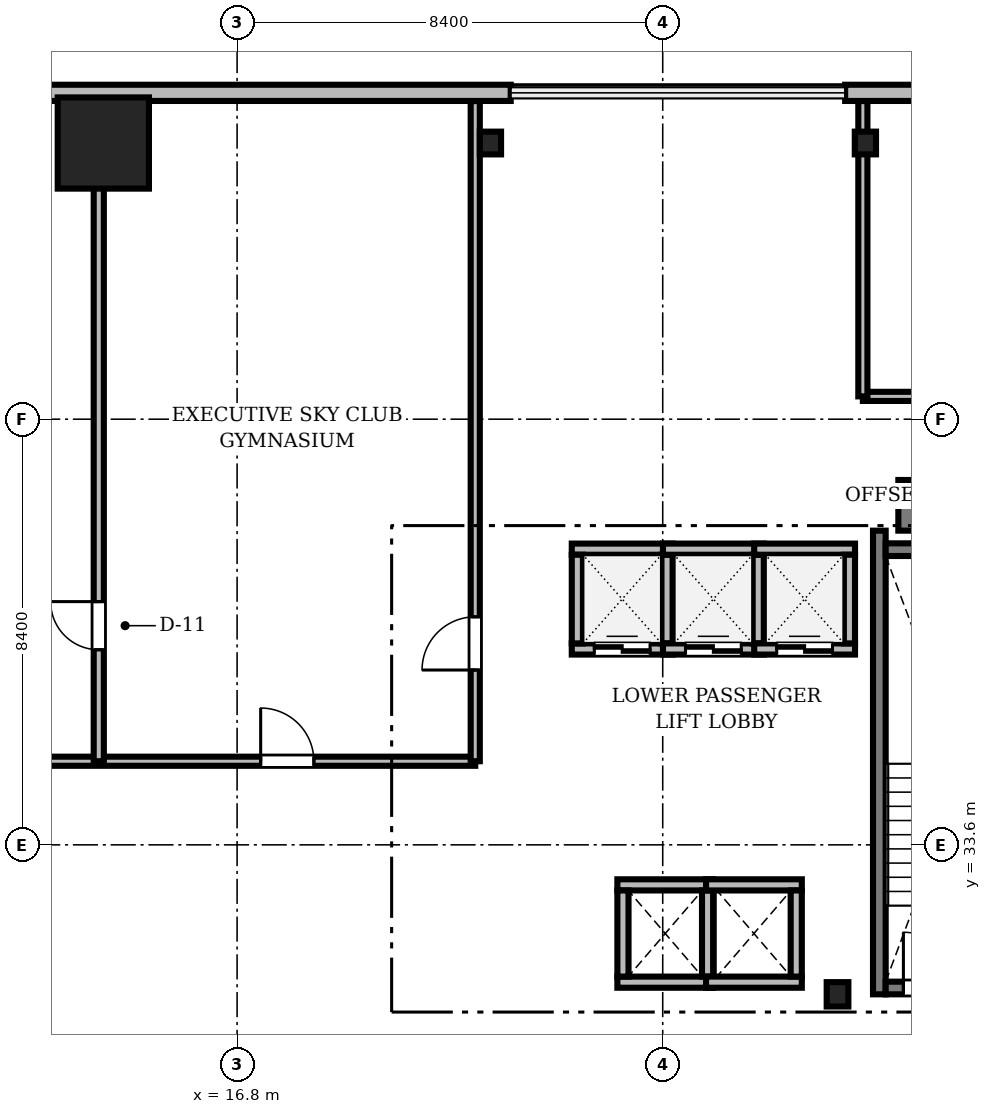
"""IFC4 building model, lengths in metres.
Left out: names, types, materials, properties, quantities, classifications, styles, units other than length and angle.
Written with IfcOpenShell. Run it as: python <this file> out.ifc"""

import sys

from ifc_helpers import new_model, si_unit, direction, frame, frame_2d, origin, origin_2d, place, context, subcontext, project, spatial, rectangle, i_section, extrude, source, transform, mapped, element, fill, save


model = new_model("IFC4")
c1 = context("Model", 3, precision=1e-05, world=origin(), true_north=direction((0.0, 1.0)))
c2 = subcontext(c1, "Body", "Model", "MODEL_VIEW")
j1 = project(units=[si_unit("LENGTHUNIT", "METRE"), si_unit("PLANEANGLEUNIT", "RADIAN")], contexts=[c1])
p1 = place(None, origin())
s1 = spatial("IfcSite", under=j1, at=p1, CompositionType="ELEMENT")
p2 = place(p1, origin())
s2 = spatial("IfcBuilding", under=s1, at=p2, CompositionType="ELEMENT")
p3 = place(p2, frame((0.0, 0.0, 78.7)))
s3 = spatial("IfcBuildingStorey", under=s2, at=p3, CompositionType="ELEMENT", Elevation=78.7)
m1 = source(origin(), c2, "Body", "SweptSolid", [
    extrude(rectangle(XDim=17.52, YDim=1.0, at=frame_2d((8.76, 0.0))), origin(), (0.0, 0.0, 1.0), 3.41),
])
p4 = place(p3, frame((29.85, 40.3, 0.0), z_axis=(0.0, 0.0, 1.0), x_axis=(1.0, 0.0, 0.0)))
e1 = element("IfcWall", 1, at=p4, inside=s3, PredefinedType="SHEAR", context=c2, shape_type="MappedRepresentation", body=[
    mapped(m1, transform((0.0, 0.0, 0.0), scale=1.0)),
])
m2 = source(origin(), c2, "Body", "SweptSolid", [
    extrude(i_section(OverallWidth=0.428, OverallDepth=0.481, WebThickness=0.04, FlangeThickness=0.063, FilletRadius=0.015, at=origin_2d()), origin(), (0.0, 0.0, 1.0), 3.41),
])
p5 = place(p3, frame((28.65, 30.65, 0.0), z_axis=(0.0, 0.0, 1.0), x_axis=(1.0, 0.0, 0.0)))
e2 = element("IfcColumn", 2, at=p5, inside=s3, PredefinedType="COLUMN", context=c2, shape_type="MappedRepresentation", body=[
    mapped(m2, transform((0.0, 0.0, 0.0), scale=1.0)),
])
m3 = source(origin(), c2, "Body", "SweptSolid", [
    extrude(rectangle(XDim=1.8, YDim=1.8, at=origin_2d()), origin(), (0.0, 0.0, 1.0), 3.41),
])
p6 = place(p3, frame((14.16, 47.45, 0.0), z_axis=(0.0, 0.0, 1.0), x_axis=(1.0, 0.0, 0.0)))
e3 = element("IfcColumn", 3, at=p6, inside=s3, PredefinedType="COLUMN", context=c2, shape_type="MappedRepresentation", body=[
    mapped(m3, transform((0.0, 0.0, 0.0), scale=1.0)),
])
m4 = source(origin(), c2, "Body", "SweptSolid", [
    extrude(i_section(OverallWidth=0.419, OverallDepth=0.449, WebThickness=0.031, FlangeThickness=0.048, FilletRadius=0.015, at=origin_2d()), origin(), (0.0, 0.0, 1.0), 3.41),
])
for number, where, z_axis, x_axis in (
    (4, (29.2, 47.45, 0.0), (0.0, 0.0, 1.0), (1.0, 0.0, 0.0)),
    (5, (21.8, 47.45, 0.0), (0.0, 0.0, 1.0), (1.0, 0.0, 0.0)),
):
    element("IfcColumn", number, at=place(p3, frame(where, z_axis=z_axis, x_axis=x_axis)), inside=s3, PredefinedType="COLUMN", context=c2, shape_type="MappedRepresentation", body=[
        mapped(m4, transform((0.0, 0.0, 0.0), scale=1.0)),
    ])
m5 = source(origin(), c2, "Body", "SweptSolid", [
    extrude(rectangle(XDim=15.6, YDim=0.32, at=frame_2d((7.8, 0.0))), origin(), (0.0, 0.0, 1.0), 3.41),
])
p7 = place(p3, frame((44.4, 48.44, 0.0), z_axis=(0.0, 0.0, 1.0), x_axis=(-1.0, 0.0, 0.0)))
e6 = element("IfcWall", 6, at=p7, inside=s3, PredefinedType="SOLIDWALL", context=c2, shape_type="MappedRepresentation", body=[
    mapped(m5, transform((0.0, 0.0, 0.0), scale=1.0)),
])
m6 = source(origin(), c2, "Body", "SweptSolid", [
    extrude(rectangle(XDim=1.4, YDim=2.3, at=frame_2d((0.7, 1.15))), frame((0.0, 0.17, 0.0), z_axis=(0.0, -1.0, 0.0), x_axis=(1.0, 0.0, 0.0)), (0.0, 0.0, 1.0), 0.34),
])
p8 = place(p7, frame((9.61, 0.0, 0.0)))
e7 = element("IfcOpeningElement", 7, at=p8, cuts=e6, PredefinedType="OPENING", context=c2, shape_type="MappedRepresentation", body=[
    mapped(m6, transform((0.0, 0.0, 0.0), scale=1.0)),
])
m7 = source(origin(), c2, "Body", "SweptSolid", [
    extrude(rectangle(XDim=2.8, YDim=2.4, at=frame_2d((1.4, 1.2))), frame((0.0, 0.17, 0.0), z_axis=(0.0, -1.0, 0.0), x_axis=(1.0, 0.0, 0.0)), (0.0, 0.0, 1.0), 0.34),
])
p9 = place(p7, frame((2.705, 0.0, 0.72)))
e8 = element("IfcOpeningElement", 8, at=p9, cuts=e6, PredefinedType="OPENING", context=c2, shape_type="MappedRepresentation", body=[
    mapped(m7, transform((0.0, 0.0, 0.0), scale=1.0)),
])
p10 = place(p3, frame((22.2, 48.44, 0.0), z_axis=(0.0, 0.0, 1.0), x_axis=(-1.0, 0.0, 0.0)))
e9 = element("IfcWall", 9, at=p10, inside=s3, PredefinedType="SOLIDWALL", context=c2, shape_type="MappedRepresentation", body=[
    mapped(m5, transform((0.0, 0.0, 0.0), scale=1.0)),
])
p11 = place(p10, frame((10.095, 0.0, 0.72)))
e10 = element("IfcOpeningElement", 10, at=p11, cuts=e9, PredefinedType="OPENING", context=c2, shape_type="MappedRepresentation", body=[
    mapped(m7, transform((0.0, 0.0, 0.0), scale=1.0)),
])
m8 = source(origin(), c2, "Body", "SweptSolid", [
    extrude(rectangle(XDim=9.15, YDim=0.25, at=frame_2d((4.575, 0.0))), origin(), (0.0, 0.0, 1.0), 3.45),
])
p12 = place(p3, frame((29.475, 30.65, 0.0), z_axis=(0.0, 0.0, 1.0), x_axis=(0.0, 1.0, 0.0)))
e11 = element("IfcWall", 11, at=p12, inside=s3, PredefinedType="SOLIDWALL", context=c2, shape_type="MappedRepresentation", body=[
    mapped(m8, transform((0.0, 0.0, 0.0), scale=1.0)),
])
m9 = source(origin(), c2, "Body", "SweptSolid", [
    extrude(rectangle(XDim=3.15, YDim=0.25, at=frame_2d((1.575, 0.0))), origin(), (0.0, 0.0, 1.0), 3.45),
])
p13 = place(p3, frame((29.6, 39.425, 0.0), z_axis=(0.0, 0.0, 1.0), x_axis=(1.0, 0.0, 0.0)))
e12 = element("IfcWall", 12, at=p13, inside=s3, PredefinedType="SOLIDWALL", context=c2, shape_type="MappedRepresentation", body=[
    mapped(m9, transform((0.0, 0.0, 0.0), scale=1.0)),
])
p14 = place(p3, frame((29.6, 30.775, 0.0), z_axis=(0.0, 0.0, 1.0), x_axis=(1.0, 0.0, 0.0)))
e13 = element("IfcWall", 13, at=p14, inside=s3, PredefinedType="SOLIDWALL", context=c2, shape_type="MappedRepresentation", body=[
    mapped(m9, transform((0.0, 0.0, 0.0), scale=1.0)),
])
m10 = source(origin(), c2, "Body", "SweptSolid", [
    extrude(rectangle(XDim=1.1, YDim=2.2, at=frame_2d((0.55, 1.1))), frame((0.0, 0.135, 0.0), z_axis=(0.0, -1.0, 0.0), x_axis=(1.0, 0.0, 0.0)), (0.0, 0.0, 1.0), 0.27),
])
p15 = place(p14, frame((0.35, 0.0, 0.0)))
e14 = element("IfcOpeningElement", 14, at=p15, cuts=e13, PredefinedType="OPENING", context=c2, shape_type="MappedRepresentation", body=[
    mapped(m10, transform((0.0, 0.0, 0.0), scale=1.0)),
])
m11 = source(origin(), c2, "Body", "SweptSolid", [
    extrude(rectangle(XDim=1.99, YDim=0.22, at=frame_2d((0.995, 0.0))), origin(), (0.0, 0.0, 1.0), 3.41),
])
p16 = place(p3, frame((23.405, 37.465, 0.0), z_axis=(0.0, 0.0, 1.0), x_axis=(1.0, 0.0, 0.0)))
e15 = element("IfcWall", 15, at=p16, inside=s3, PredefinedType="SOLIDWALL", context=c2, shape_type="MappedRepresentation", body=[
    mapped(m11, transform((0.0, 0.0, 0.0), scale=1.0)),
])
m12 = source(origin(), c2, "Body", "SweptSolid", [
    extrude(rectangle(XDim=1.1, YDim=2.2, at=frame_2d((0.55, 1.1))), frame((0.0, 0.12, 0.0), z_axis=(0.0, -1.0, 0.0), x_axis=(1.0, 0.0, 0.0)), (0.0, 0.0, 1.0), 0.24),
])
p17 = place(p16, frame((0.445, 0.0, 0.0)))
e16 = element("IfcOpeningElement", 16, at=p17, cuts=e15, PredefinedType="OPENING", context=c2, shape_type="MappedRepresentation", body=[
    mapped(m12, transform((0.0, 0.0, 0.0), scale=1.0)),
])
p18 = place(p3, frame((23.405, 39.435, 0.0), z_axis=(0.0, 0.0, 1.0), x_axis=(1.0, 0.0, 0.0)))
e17 = element("IfcWall", 17, at=p18, inside=s3, PredefinedType="SOLIDWALL", context=c2, shape_type="MappedRepresentation", body=[
    mapped(m11, transform((0.0, 0.0, 0.0), scale=1.0)),
])
m13 = source(origin(), c2, "Body", "SweptSolid", [
    extrude(rectangle(XDim=1.75, YDim=0.22, at=frame_2d((0.875, 0.0))), origin(), (0.0, 0.0, 1.0), 3.41),
])
for number, where, z_axis, x_axis in (
    (18, (23.515, 37.575, 0.0), (0.0, 0.0, 1.0), (0.0, 1.0, 0.0)),
    (19, (25.285, 37.575, 0.0), (0.0, 0.0, 1.0), (0.0, 1.0, 0.0)),
):
    element("IfcWall", number, at=place(p3, frame(where, z_axis=z_axis, x_axis=x_axis)), inside=s3, PredefinedType="SOLIDWALL", context=c2, shape_type="MappedRepresentation", body=[
        mapped(m13, transform((0.0, 0.0, 0.0), scale=1.0)),
    ])
p19 = place(p3, frame((25.205, 37.465, 0.0), z_axis=(0.0, 0.0, 1.0), x_axis=(1.0, 0.0, 0.0)))
e20 = element("IfcWall", 20, at=p19, inside=s3, PredefinedType="SOLIDWALL", context=c2, shape_type="MappedRepresentation", body=[
    mapped(m11, transform((0.0, 0.0, 0.0), scale=1.0)),
])
p20 = place(p19, frame((0.445, 0.0, 0.0)))
e21 = element("IfcOpeningElement", 21, at=p20, cuts=e20, PredefinedType="OPENING", context=c2, shape_type="MappedRepresentation", body=[
    mapped(m12, transform((0.0, 0.0, 0.0), scale=1.0)),
])
p21 = place(p3, frame((25.205, 39.435, 0.0), z_axis=(0.0, 0.0, 1.0), x_axis=(1.0, 0.0, 0.0)))
e22 = element("IfcWall", 22, at=p21, inside=s3, PredefinedType="SOLIDWALL", context=c2, shape_type="MappedRepresentation", body=[
    mapped(m11, transform((0.0, 0.0, 0.0), scale=1.0)),
])
p22 = place(p3, frame((27.085, 37.575, 0.0), z_axis=(0.0, 0.0, 1.0), x_axis=(0.0, 1.0, 0.0)))
e23 = element("IfcWall", 23, at=p22, inside=s3, PredefinedType="SOLIDWALL", context=c2, shape_type="MappedRepresentation", body=[
    mapped(m13, transform((0.0, 0.0, 0.0), scale=1.0)),
])
m14 = source(origin(), c2, "Body", "SweptSolid", [
    extrude(rectangle(XDim=1.99, YDim=0.22, at=frame_2d((0.995, 0.0))), origin(), (0.0, 0.0, 1.0), 3.41),
])
p23 = place(p3, frame((27.005, 37.465, 0.0), z_axis=(0.0, 0.0, 1.0), x_axis=(1.0, 0.0, 0.0)))
e24 = element("IfcWall", 24, at=p23, inside=s3, PredefinedType="SOLIDWALL", context=c2, shape_type="MappedRepresentation", body=[
    mapped(m14, transform((0.0, 0.0, 0.0), scale=1.0)),
])
p24 = place(p23, frame((0.445, 0.0, 0.0)))
e25 = element("IfcOpeningElement", 25, at=p24, cuts=e24, PredefinedType="OPENING", context=c2, shape_type="MappedRepresentation", body=[
    mapped(m12, transform((0.0, 0.0, 0.0), scale=1.0)),
])
p25 = place(p3, frame((27.005, 39.435, 0.0), z_axis=(0.0, 0.0, 1.0), x_axis=(1.0, 0.0, 0.0)))
e26 = element("IfcWall", 26, at=p25, inside=s3, PredefinedType="SOLIDWALL", context=c2, shape_type="MappedRepresentation", body=[
    mapped(m14, transform((0.0, 0.0, 0.0), scale=1.0)),
])
p26 = place(p3, frame((28.885, 37.575, 0.0), z_axis=(0.0, 0.0, 1.0), x_axis=(0.0, 1.0, 0.0)))
e27 = element("IfcWall", 27, at=p26, inside=s3, PredefinedType="SOLIDWALL", context=c2, shape_type="MappedRepresentation", body=[
    mapped(m13, transform((0.0, 0.0, 0.0), scale=1.0)),
])
m15 = source(origin(), c2, "Body", "SweptSolid", [
    extrude(rectangle(XDim=1.89, YDim=0.22, at=frame_2d((0.945, 0.0))), origin(), (0.0, 0.0, 1.0), 3.41),
])
for number, where, z_axis, x_axis in (
    (28, (24.305, 30.89, 0.0), (0.0, 0.0, 1.0), (1.0, 0.0, 0.0)),
    (29, (24.305, 32.81, 0.0), (0.0, 0.0, 1.0), (1.0, 0.0, 0.0)),
):
    element("IfcWall", number, at=place(p3, frame(where, z_axis=z_axis, x_axis=x_axis)), inside=s3, PredefinedType="SOLIDWALL", context=c2, shape_type="MappedRepresentation", body=[
        mapped(m15, transform((0.0, 0.0, 0.0), scale=1.0)),
    ])
m16 = source(origin(), c2, "Body", "SweptSolid", [
    extrude(rectangle(XDim=1.7, YDim=0.22, at=frame_2d((0.85, 0.0))), origin(), (0.0, 0.0, 1.0), 3.41),
])
for number, where, z_axis, x_axis in (
    (30, (24.415, 31.0, 0.0), (0.0, 0.0, 1.0), (0.0, 1.0, 0.0)),
    (31, (26.085, 31.0, 0.0), (0.0, 0.0, 1.0), (0.0, 1.0, 0.0)),
):
    element("IfcWall", number, at=place(p3, frame(where, z_axis=z_axis, x_axis=x_axis)), inside=s3, PredefinedType="SOLIDWALL", context=c2, shape_type="MappedRepresentation", body=[
        mapped(m16, transform((0.0, 0.0, 0.0), scale=1.0)),
    ])
for number, where, z_axis, x_axis in (
    (32, (26.055, 30.89, 0.0), (0.0, 0.0, 1.0), (1.0, 0.0, 0.0)),
    (33, (26.055, 32.81, 0.0), (0.0, 0.0, 1.0), (1.0, 0.0, 0.0)),
):
    element("IfcWall", number, at=place(p3, frame(where, z_axis=z_axis, x_axis=x_axis)), inside=s3, PredefinedType="SOLIDWALL", context=c2, shape_type="MappedRepresentation", body=[
        mapped(m15, transform((0.0, 0.0, 0.0), scale=1.0)),
    ])
p27 = place(p3, frame((27.835, 31.0, 0.0), z_axis=(0.0, 0.0, 1.0), x_axis=(0.0, 1.0, 0.0)))
e34 = element("IfcWall", 34, at=p27, inside=s3, PredefinedType="SOLIDWALL", context=c2, shape_type="MappedRepresentation", body=[
    mapped(m16, transform((0.0, 0.0, 0.0), scale=1.0)),
])
m17 = source(origin(), c2, "Body", "SweptSolid", [
    extrude(rectangle(XDim=19.428, YDim=0.18, at=frame_2d((9.714, 0.0))), origin(), (0.0, 0.0, 1.0), 2.652),
])
p28 = place(p3, frame((29.15, 42.45, 0.0), z_axis=(0.0, 0.0, 1.0), x_axis=(1.0, 0.0, 0.0)))
e35 = element("IfcWall", 35, at=p28, inside=s3, PredefinedType="PARTITIONING", context=c2, shape_type="MappedRepresentation", body=[
    mapped(m17, transform((0.0, 0.0, 0.0), scale=1.0)),
])
m18 = source(origin(), c2, "Body", "SweptSolid", [
    extrude(rectangle(XDim=1.05, YDim=2.2, at=frame_2d((0.525, 1.1))), frame((0.0, 0.1, 0.0), z_axis=(0.0, -1.0, 0.0), x_axis=(1.0, 0.0, 0.0)), (0.0, 0.0, 1.0), 0.2),
])
p29 = place(p28, frame((4.5, 0.0, 0.0)))
e36 = element("IfcOpeningElement", 36, at=p29, cuts=e35, PredefinedType="OPENING", context=c2, shape_type="MappedRepresentation", body=[
    mapped(m18, transform((0.0, 0.0, 0.0), scale=1.0)),
])
m19 = source(origin(), c2, "Body", "SweptSolid", [
    extrude(rectangle(XDim=19.078, YDim=0.18, at=frame_2d((9.539, 0.0))), origin(), (0.0, 0.0, 1.0), 2.652),
])
p30 = place(p3, frame((2.422, 35.25, 0.0), z_axis=(0.0, 0.0, 1.0), x_axis=(1.0, 0.0, 0.0)))
e37 = element("IfcWall", 37, at=p30, inside=s3, PredefinedType="PARTITIONING", context=c2, shape_type="MappedRepresentation", body=[
    mapped(m19, transform((0.0, 0.0, 0.0), scale=1.0)),
])
p31 = place(p30, frame((14.843, 0.0, 0.0)))
e38 = element("IfcOpeningElement", 38, at=p31, cuts=e37, PredefinedType="OPENING", context=c2, shape_type="MappedRepresentation", body=[
    mapped(m18, transform((0.0, 0.0, 0.0), scale=1.0)),
])
m20 = source(origin(), c2, "Body", "SweptSolid", [
    extrude(rectangle(XDim=13.028, YDim=0.2, at=frame_2d((6.514, 0.0))), origin(), (0.0, 0.0, 1.0), 2.652),
])
p32 = place(p3, frame((14.07, 35.25, 0.0), z_axis=(0.0, 0.0, 1.0), x_axis=(0.0, 1.0, 0.0)))
e39 = element("IfcWall", 39, at=p32, inside=s3, PredefinedType="PARTITIONING", context=c2, shape_type="MappedRepresentation", body=[
    mapped(m20, transform((0.0, 0.0, 0.0), scale=1.0)),
])
m21 = source(origin(), c2, "Body", "SweptSolid", [
    extrude(rectangle(XDim=0.95, YDim=2.15, at=frame_2d((0.475, 1.075))), frame((0.0, 0.11, 0.0), z_axis=(0.0, -1.0, 0.0), x_axis=(1.0, 0.0, 0.0)), (0.0, 0.0, 1.0), 0.22),
])
p33 = place(p32, frame((2.2, 0.0, 0.0)))
e40 = element("IfcOpeningElement", 40, at=p33, cuts=e39, PredefinedType="OPENING", context=c2, shape_type="MappedRepresentation", body=[
    mapped(m21, transform((0.0, 0.0, 0.0), scale=1.0)),
])
m22 = source(origin(), c2, "Body", "SweptSolid", [
    extrude(rectangle(XDim=13.028, YDim=0.18, at=frame_2d((6.514, 0.0))), origin(), (0.0, 0.0, 1.0), 2.652),
])
p34 = place(p3, frame((21.5, 35.25, 0.0), z_axis=(0.0, 0.0, 1.0), x_axis=(0.0, 1.0, 0.0)))
e41 = element("IfcWall", 41, at=p34, inside=s3, PredefinedType="PARTITIONING", context=c2, shape_type="MappedRepresentation", body=[
    mapped(m22, transform((0.0, 0.0, 0.0), scale=1.0)),
])
p35 = place(p34, frame((1.8, 0.0, 0.0)))
e42 = element("IfcOpeningElement", 42, at=p35, cuts=e41, PredefinedType="OPENING", context=c2, shape_type="MappedRepresentation", body=[
    mapped(m18, transform((0.0, 0.0, 0.0), scale=1.0)),
])
m23 = source(origin(), c2, "Body", "SweptSolid", [
    extrude(rectangle(XDim=5.828, YDim=0.18, at=frame_2d((2.914, 0.0))), origin(), (0.0, 0.0, 1.0), 2.652),
])
p36 = place(p3, frame((29.15, 42.45, 0.0), z_axis=(0.0, 0.0, 1.0), x_axis=(0.0, 1.0, 0.0)))
e43 = element("IfcWall", 43, at=p36, inside=s3, PredefinedType="PARTITIONING", context=c2, shape_type="MappedRepresentation", body=[
    mapped(m23, transform((0.0, 0.0, 0.0), scale=1.0)),
])
m24 = source(origin(), c2, "Body", "SweptSolid", [
    extrude(rectangle(XDim=1.1, YDim=2.2, at=frame_2d((0.55, 1.1))), frame((0.0, 0.025, 0.0), z_axis=(0.0, -1.0, 0.0), x_axis=(1.0, 0.0, 0.0)), (0.0, 0.0, 1.0), 0.05),
])
p37 = place(p15, origin())
e44 = element("IfcDoor", 44, at=p37, inside=s3, OperationType="SINGLE_SWING_LEFT", PredefinedType="DOOR", context=c2, shape_type="MappedRepresentation", body=[
    mapped(m24, transform((0.0, 0.0, 0.0), scale=1.0)),
])
fill(e14, e44)
p38 = place(p17, origin())
e45 = element("IfcDoor", 45, at=p38, inside=s3, OperationType="DOUBLE_DOOR_SLIDING", PredefinedType="DOOR", context=c2, shape_type="MappedRepresentation", body=[
    mapped(m24, transform((0.0, 0.0, 0.0), scale=1.0)),
])
fill(e16, e45)
p39 = place(p20, origin())
e46 = element("IfcDoor", 46, at=p39, inside=s3, OperationType="DOUBLE_DOOR_SLIDING", PredefinedType="DOOR", context=c2, shape_type="MappedRepresentation", body=[
    mapped(m24, transform((0.0, 0.0, 0.0), scale=1.0)),
])
fill(e21, e46)
p40 = place(p24, origin())
e47 = element("IfcDoor", 47, at=p40, inside=s3, OperationType="DOUBLE_DOOR_SLIDING", PredefinedType="DOOR", context=c2, shape_type="MappedRepresentation", body=[
    mapped(m24, transform((0.0, 0.0, 0.0), scale=1.0)),
])
fill(e25, e47)
m25 = source(origin(), c2, "Body", "SweptSolid", [
    extrude(rectangle(XDim=1.05, YDim=2.2, at=frame_2d((0.525, 1.1))), frame((0.0, 0.025, 0.0), z_axis=(0.0, -1.0, 0.0), x_axis=(1.0, 0.0, 0.0)), (0.0, 0.0, 1.0), 0.05),
])
p41 = place(p31, origin())
e48 = element("IfcDoor", 48, at=p41, inside=s3, OperationType="SINGLE_SWING_LEFT", PredefinedType="DOOR", context=c2, shape_type="MappedRepresentation", body=[
    mapped(m25, transform((0.0, 0.0, 0.0), scale=1.0)),
])
fill(e38, e48)
m26 = source(origin(), c2, "Body", "SweptSolid", [
    extrude(rectangle(XDim=0.95, YDim=2.15, at=frame_2d((0.475, 1.075))), frame((0.0, 0.025, 0.0), z_axis=(0.0, -1.0, 0.0), x_axis=(1.0, 0.0, 0.0)), (0.0, 0.0, 1.0), 0.05),
])
p42 = place(p33, origin())
e49 = element("IfcDoor", 49, at=p42, inside=s3, OperationType="SINGLE_SWING_RIGHT", PredefinedType="DOOR", context=c2, shape_type="MappedRepresentation", body=[
    mapped(m26, transform((0.0, 0.0, 0.0), scale=1.0)),
])
fill(e40, e49)
p43 = place(p35, origin())
e50 = element("IfcDoor", 50, at=p43, inside=s3, OperationType="SINGLE_SWING_LEFT", PredefinedType="DOOR", context=c2, shape_type="MappedRepresentation", body=[
    mapped(m25, transform((0.0, 0.0, 0.0), scale=1.0)),
])
fill(e42, e50)
save(model, sys.argv[1])
